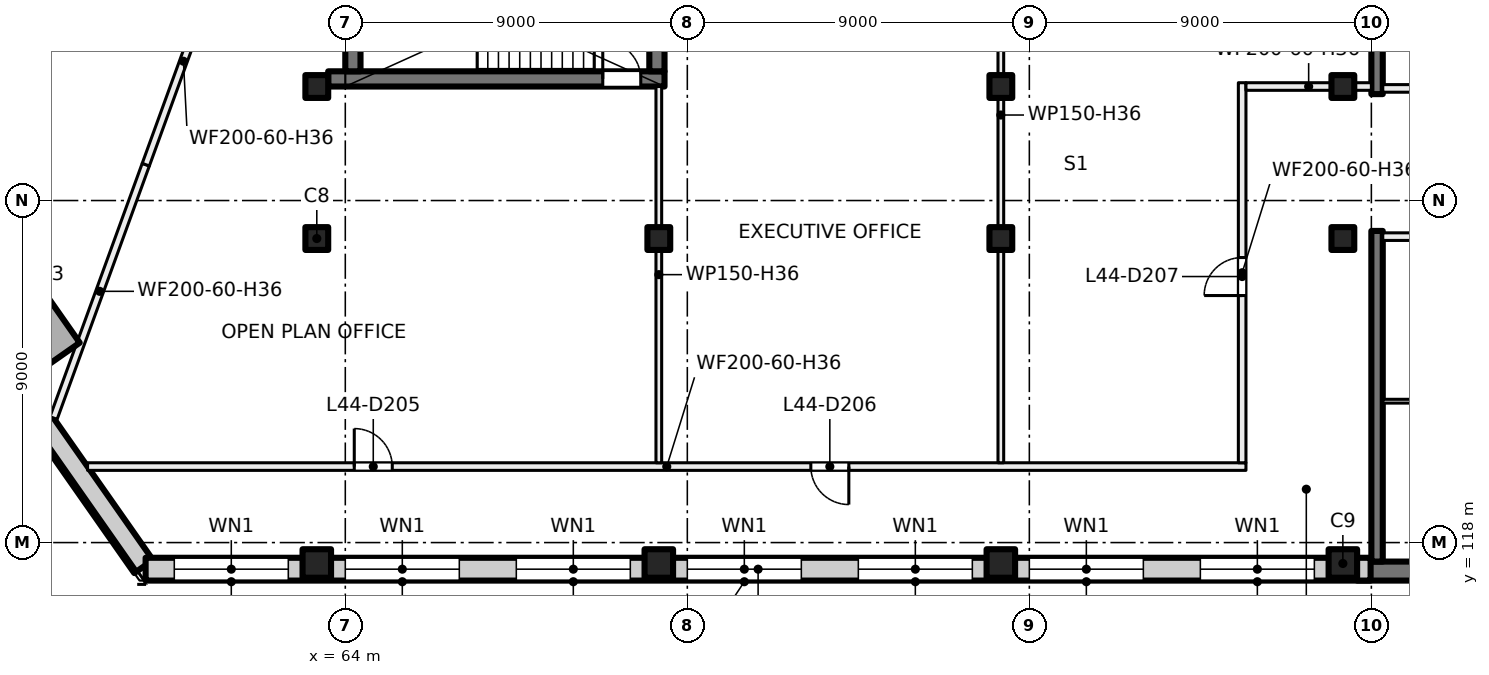
"""IFC4 building model, lengths in metres.
Left out: names, types, materials, properties, quantities, classifications, styles, units other than length and angle.
Written with IfcOpenShell. Run it as: python <this file> out.ifc"""

import sys

from ifc_helpers import new_model, si_unit, direction, frame, frame_2d, origin, origin_2d, place, context, subcontext, project, spatial, rectangle, hollow_rectangle, extrude, element, fill, save


model = new_model("IFC4")
c1 = context("Model", 3, precision=1e-05, world=origin(), true_north=direction((0.0, 1.0)))
c2 = subcontext(c1, "Body", "Model", "MODEL_VIEW")
j1 = project(units=[si_unit("LENGTHUNIT", "METRE"), si_unit("PLANEANGLEUNIT", "RADIAN")], contexts=[c1])
p1 = place(None, origin())
s1 = spatial("IfcSite", under=j1, at=p1, CompositionType="ELEMENT")
p2 = place(p1, origin())
s2 = spatial("IfcBuilding", under=s1, at=p2, CompositionType="ELEMENT")
p3 = place(p2, frame((0.0, 0.0, 188.0)))
s3 = spatial("IfcBuildingStorey", under=s2, at=p3, CompositionType="ELEMENT", Elevation=188.0)
p4 = place(p3, frame((56.036, 123.43, 0.0), z_axis=(0.0, 0.0, 1.0), x_axis=(0.573576436351, -0.819152044289, 0.0)))
e1 = element("IfcColumn", 1, at=p4, inside=s3, PredefinedType="COLUMN", context=c2, shape_type="SweptSolid", body=[
    extrude(hollow_rectangle(XDim=1.4, YDim=1.4, WallThickness=0.032, at=origin_2d()), origin(), (0.0, 0.0, 1.0), 4.0),
])
for number, where, z_axis, x_axis in (
    (2, (63.25, 130.0, 0.0), (0.0, 0.0, 1.0), (1.0, 0.0, 0.0)),
    (3, (81.25, 130.0, 0.0), (0.0, 0.0, 1.0), (1.0, 0.0, 0.0)),
    (4, (90.25, 130.0, 0.0), (0.0, 0.0, 1.0), (1.0, 0.0, 0.0)),
    (5, (63.25, 126.0, 0.0), (0.0, 0.0, 1.0), (1.0, 0.0, 0.0)),
    (6, (72.25, 126.0, 0.0), (0.0, 0.0, 1.0), (1.0, 0.0, 0.0)),
    (7, (81.25, 126.0, 0.0), (0.0, 0.0, 1.0), (1.0, 0.0, 0.0)),
    (8, (90.25, 126.0, 0.0), (0.0, 0.0, 1.0), (1.0, 0.0, 0.0)),
):
    element("IfcColumn", number, at=place(p3, frame(where, z_axis=z_axis, x_axis=x_axis)), inside=s3, PredefinedType="COLUMN", context=c2, shape_type="SweptSolid", body=[
        extrude(rectangle(XDim=0.6, YDim=0.6, at=origin_2d()), origin(), (0.0, 0.0, 1.0), 4.0),
    ])
for number, where, z_axis, x_axis in (
    (9, (63.25, 117.45, 0.0), (0.0, 0.0, 1.0), (1.0, 0.0, 0.0)),
    (10, (72.25, 117.45, 0.0), (0.0, 0.0, 1.0), (1.0, 0.0, 0.0)),
    (11, (81.25, 117.45, 0.0), (0.0, 0.0, 1.0), (1.0, 0.0, 0.0)),
    (12, (90.25, 117.45, 0.0), (0.0, 0.0, 1.0), (1.0, 0.0, 0.0)),
):
    element("IfcColumn", number, at=place(p3, frame(where, z_axis=z_axis, x_axis=x_axis)), inside=s3, PredefinedType="COLUMN", context=c2, shape_type="SweptSolid", body=[
        extrude(rectangle(XDim=0.75, YDim=0.75, at=origin_2d()), origin(), (0.0, 0.0, 1.0), 4.0),
    ])
p5 = place(p3, frame((99.6, 117.25, 0.0), z_axis=(0.0, 0.0, 1.0), x_axis=(-1.0, 0.0, 0.0)))
e13 = element("IfcWall", 13, at=p5, inside=s3, PredefinedType="SHEAR", context=c2, shape_type="SweptSolid", body=[
    extrude(rectangle(XDim=8.975, YDim=0.5, at=frame_2d((4.488, 0.0))), origin(), (0.0, 0.0, 1.0), 4.0),
])
for number, where, z_axis, x_axis in (
    (14, (91.15, 138.5, 0.0), (0.0, 0.0, 1.0), (0.0, -1.0, 0.0)),
    (15, (91.15, 126.2, 0.0), (0.0, 0.0, 1.0), (0.0, -1.0, 0.0)),
):
    element("IfcWall", number, at=place(p3, frame(where, z_axis=z_axis, x_axis=x_axis)), inside=s3, PredefinedType="SHEAR", context=c2, shape_type="SweptSolid", body=[
        extrude(rectangle(XDim=8.7, YDim=0.3, at=frame_2d((4.35, 0.0))), origin(), (0.0, 0.0, 1.0), 4.0),
    ])
p6 = place(p3, frame((63.55, 130.2, 0.0), z_axis=(0.0, 0.0, 1.0), x_axis=(1.0, 0.0, 0.0)))
e16 = element("IfcWall", 16, at=p6, inside=s3, PredefinedType="SHEAR", context=c2, shape_type="SweptSolid", body=[
    extrude(rectangle(XDim=8.85, YDim=0.4, at=frame_2d((4.425, 0.0))), origin(), (0.0, 0.0, 1.0), 4.0),
])
p7 = place(p6, frame((7.225, 0.0, 0.0)))
e17 = element("IfcOpeningElement", 17, at=p7, cuts=e16, PredefinedType="OPENING", context=c2, shape_type="SweptSolid", body=[
    extrude(rectangle(XDim=1.0, YDim=2.1, at=frame_2d((0.5, 1.05))), frame((0.0, 0.21, 0.0), z_axis=(0.0, -1.0, 0.0), x_axis=(1.0, 0.0, 0.0)), (0.0, 0.0, 1.0), 0.42),
])
for number, where, z_axis, x_axis in (
    (18, (64.2, 130.4, 0.0), (0.0, 0.0, 1.0), (0.0, 1.0, 0.0)),
    (19, (72.2, 130.4, 0.0), (0.0, 0.0, 1.0), (0.0, 1.0, 0.0)),
):
    element("IfcWall", number, at=place(p3, frame(where, z_axis=z_axis, x_axis=x_axis)), inside=s3, PredefinedType="SHEAR", context=c2, shape_type="SweptSolid", body=[
        extrude(rectangle(XDim=3.0, YDim=0.4, at=frame_2d((1.5, 0.0))), origin(), (0.0, 0.0, 1.0), 4.0),
    ])
p8 = place(p3, frame((58.694, 117.369, 0.0), z_axis=(0.0, 0.0, 1.0), x_axis=(-0.573579564522, 0.819149853911, 0.0)))
e20 = element("IfcWall", 20, at=p8, inside=s3, PredefinedType="SOLIDWALL", context=c2, shape_type="SweptSolid", body=[
    extrude(rectangle(XDim=26.138, YDim=0.6, at=frame_2d((13.069, 0.0))), origin(), (0.0, 0.0, 1.0), 3.625),
])
p9 = place(p3, frame((90.98, 117.3, 0.0), z_axis=(0.0, 0.0, 1.0), x_axis=(-1.0, 0.0, 0.0)))
e21 = element("IfcWall", 21, at=p9, inside=s3, PredefinedType="SOLIDWALL", context=c2, shape_type="SweptSolid", body=[
    extrude(rectangle(XDim=32.235, YDim=0.6, at=frame_2d((16.117, 0.0))), origin(), (0.0, 0.0, 1.0), 3.625),
])
p10 = place(p9, frame((1.48, 0.0, 0.9)))
e22 = element("IfcOpeningElement", 22, at=p10, cuts=e21, PredefinedType="OPENING", context=c2, shape_type="SweptSolid", body=[
    extrude(rectangle(XDim=3.0, YDim=2.4, at=frame_2d((1.5, 1.2))), frame((0.0, 0.31, 0.0), z_axis=(0.0, -1.0, 0.0), x_axis=(1.0, 0.0, 0.0)), (0.0, 0.0, 1.0), 0.62),
])
p11 = place(p9, frame((5.98, 0.0, 0.9)))
e23 = element("IfcOpeningElement", 23, at=p11, cuts=e21, PredefinedType="OPENING", context=c2, shape_type="SweptSolid", body=[
    extrude(rectangle(XDim=3.0, YDim=2.4, at=frame_2d((1.5, 1.2))), frame((0.0, 0.31, 0.0), z_axis=(0.0, -1.0, 0.0), x_axis=(1.0, 0.0, 0.0)), (0.0, 0.0, 1.0), 0.62),
])
p12 = place(p9, frame((10.48, 0.0, 0.9)))
e24 = element("IfcOpeningElement", 24, at=p12, cuts=e21, PredefinedType="OPENING", context=c2, shape_type="SweptSolid", body=[
    extrude(rectangle(XDim=3.0, YDim=2.4, at=frame_2d((1.5, 1.2))), frame((0.0, 0.31, 0.0), z_axis=(0.0, -1.0, 0.0), x_axis=(1.0, 0.0, 0.0)), (0.0, 0.0, 1.0), 0.62),
])
p13 = place(p9, frame((14.98, 0.0, 0.9)))
e25 = element("IfcOpeningElement", 25, at=p13, cuts=e21, PredefinedType="OPENING", context=c2, shape_type="SweptSolid", body=[
    extrude(rectangle(XDim=3.0, YDim=2.4, at=frame_2d((1.5, 1.2))), frame((0.0, 0.31, 0.0), z_axis=(0.0, -1.0, 0.0), x_axis=(1.0, 0.0, 0.0)), (0.0, 0.0, 1.0), 0.62),
])
p14 = place(p9, frame((19.48, 0.0, 0.9)))
e26 = element("IfcOpeningElement", 26, at=p14, cuts=e21, PredefinedType="OPENING", context=c2, shape_type="SweptSolid", body=[
    extrude(rectangle(XDim=3.0, YDim=2.4, at=frame_2d((1.5, 1.2))), frame((0.0, 0.31, 0.0), z_axis=(0.0, -1.0, 0.0), x_axis=(1.0, 0.0, 0.0)), (0.0, 0.0, 1.0), 0.62),
])
p15 = place(p9, frame((23.98, 0.0, 0.9)))
e27 = element("IfcOpeningElement", 27, at=p15, cuts=e21, PredefinedType="OPENING", context=c2, shape_type="SweptSolid", body=[
    extrude(rectangle(XDim=3.0, YDim=2.4, at=frame_2d((1.5, 1.2))), frame((0.0, 0.31, 0.0), z_axis=(0.0, -1.0, 0.0), x_axis=(1.0, 0.0, 0.0)), (0.0, 0.0, 1.0), 0.62),
])
p16 = place(p9, frame((28.48, 0.0, 0.9)))
e28 = element("IfcOpeningElement", 28, at=p16, cuts=e21, PredefinedType="OPENING", context=c2, shape_type="SweptSolid", body=[
    extrude(rectangle(XDim=3.0, YDim=2.4, at=frame_2d((1.5, 1.2))), frame((0.0, 0.31, 0.0), z_axis=(0.0, -1.0, 0.0), x_axis=(1.0, 0.0, 0.0)), (0.0, 0.0, 1.0), 0.62),
])
p17 = place(p3, frame((95.25, 126.05, 0.0), z_axis=(0.0, 0.0, 1.0), x_axis=(-1.0, 0.0, 0.0)))
e29 = element("IfcWall", 29, at=p17, inside=s3, PredefinedType="PARTITIONING", context=c2, shape_type="SweptSolid", body=[
    extrude(rectangle(XDim=3.95, YDim=0.2, at=frame_2d((1.975, 0.0))), origin(), (0.0, 0.0, 1.0), 3.625),
])
p18 = place(p17, frame((0.3, 0.0, 0.0)))
e30 = element("IfcOpeningElement", 30, at=p18, cuts=e29, PredefinedType="OPENING", context=c2, shape_type="SweptSolid", body=[
    extrude(rectangle(XDim=1.2, YDim=2.1, at=frame_2d((0.6, 1.05))), frame((0.0, 0.11, 0.0), z_axis=(0.0, -1.0, 0.0), x_axis=(1.0, 0.0, 0.0)), (0.0, 0.0, 1.0), 0.22),
])
p19 = place(p3, frame((93.4, 121.72, 0.0), z_axis=(0.0, 0.0, 1.0), x_axis=(-1.0, 0.0, 0.0)))
e31 = element("IfcWall", 31, at=p19, inside=s3, PredefinedType="PARTITIONING", context=c2, shape_type="SweptSolid", body=[
    extrude(rectangle(XDim=2.1, YDim=0.1, at=frame_2d((1.05, 0.0))), origin(), (0.0, 0.0, 1.0), 3.625),
])
p20 = place(p3, frame((91.3, 129.95, 0.0), z_axis=(0.0, 0.0, 1.0), x_axis=(1.0, 0.0, 0.0)))
e32 = element("IfcWall", 32, at=p20, inside=s3, PredefinedType="PARTITIONING", context=c2, shape_type="SweptSolid", body=[
    extrude(rectangle(XDim=3.95, YDim=0.2, at=frame_2d((1.975, 0.0))), origin(), (0.0, 0.0, 1.0), 3.625),
])
p21 = place(p20, frame((2.45, 0.0, 0.0)))
e33 = element("IfcOpeningElement", 33, at=p21, cuts=e32, PredefinedType="OPENING", context=c2, shape_type="SweptSolid", body=[
    extrude(rectangle(XDim=1.2, YDim=2.1, at=frame_2d((0.6, 1.05))), frame((0.0, 0.11, 0.0), z_axis=(0.0, -1.0, 0.0), x_axis=(1.0, 0.0, 0.0)), (0.0, 0.0, 1.0), 0.22),
])
p22 = place(p3, frame((53.523, 125.277, 0.0), z_axis=(0.0, 0.0, 1.0), x_axis=(0.341962677516, 0.93971353464, 0.0)))
e34 = element("IfcWall", 34, at=p22, inside=s3, PredefinedType="PARTITIONING", context=c2, shape_type="SweptSolid", body=[
    extrude(rectangle(XDim=10.086, YDim=0.2, at=frame_2d((5.043, 0.0))), origin(), (0.0, 0.0, 1.0), 3.625),
])
p23 = place(p3, frame((56.323, 121.278, 0.0), z_axis=(0.0, 0.0, 1.0), x_axis=(0.342116070913, 0.939657700454, 0.0)))
e35 = element("IfcWall", 35, at=p23, inside=s3, PredefinedType="PARTITIONING", context=c2, shape_type="SweptSolid", body=[
    extrude(rectangle(XDim=7.094, YDim=0.2, at=frame_2d((3.547, 0.0))), origin(), (0.0, 0.0, 1.0), 3.625),
])
p24 = place(p3, frame((57.218, 120.0, 0.0), z_axis=(0.0, 0.0, 1.0), x_axis=(1.0, 0.0, 0.0)))
e36 = element("IfcWall", 36, at=p24, inside=s3, PredefinedType="PARTITIONING", context=c2, shape_type="SweptSolid", body=[
    extrude(rectangle(XDim=30.482, YDim=0.2, at=frame_2d((15.241, 0.0))), origin(), (0.0, 0.0, 1.0), 3.625),
])
p25 = place(p24, frame((7.018, 0.0, 0.0)))
e37 = element("IfcOpeningElement", 37, at=p25, cuts=e36, PredefinedType="OPENING", context=c2, shape_type="SweptSolid", body=[
    extrude(rectangle(XDim=1.0, YDim=2.1, at=frame_2d((0.5, 1.05))), frame((0.0, 0.11, 0.0), z_axis=(0.0, -1.0, 0.0), x_axis=(1.0, 0.0, 0.0)), (0.0, 0.0, 1.0), 0.22),
])
p26 = place(p24, frame((19.032, 0.0, 0.0)))
e38 = element("IfcOpeningElement", 38, at=p26, cuts=e36, PredefinedType="OPENING", context=c2, shape_type="SweptSolid", body=[
    extrude(rectangle(XDim=1.0, YDim=2.1, at=frame_2d((0.5, 1.05))), frame((0.0, 0.11, 0.0), z_axis=(0.0, -1.0, 0.0), x_axis=(1.0, 0.0, 0.0)), (0.0, 0.0, 1.0), 0.22),
])
p27 = place(p3, frame((58.75, 127.944, 0.0), z_axis=(0.0, 0.0, 1.0), x_axis=(0.342007027005, 0.939697394633, 0.0)))
e39 = element("IfcWall", 39, at=p27, inside=s3, PredefinedType="PARTITIONING", context=c2, shape_type="SweptSolid", body=[
    extrude(rectangle(XDim=5.792, YDim=0.2, at=frame_2d((2.896, 0.0))), origin(), (0.0, 0.0, 1.0), 3.625),
])
p28 = place(p3, frame((72.25, 120.1, 0.0), z_axis=(0.0, 0.0, 1.0), x_axis=(0.0, 1.0, 0.0)))
e40 = element("IfcWall", 40, at=p28, inside=s3, PredefinedType="PARTITIONING", context=c2, shape_type="SweptSolid", body=[
    extrude(rectangle(XDim=9.9, YDim=0.15, at=frame_2d((4.95, 0.0))), origin(), (0.0, 0.0, 1.0), 3.625),
])
p29 = place(p3, frame((81.25, 120.1, 0.0), z_axis=(0.0, 0.0, 1.0), x_axis=(0.0, 1.0, 0.0)))
e41 = element("IfcWall", 41, at=p29, inside=s3, PredefinedType="PARTITIONING", context=c2, shape_type="SweptSolid", body=[
    extrude(rectangle(XDim=18.3, YDim=0.15, at=frame_2d((9.15, 0.0))), origin(), (0.0, 0.0, 1.0), 3.625),
])
p30 = place(p3, frame((87.6, 120.1, 0.0), z_axis=(0.0, 0.0, 1.0), x_axis=(0.0, 1.0, 0.0)))
e42 = element("IfcWall", 42, at=p30, inside=s3, PredefinedType="PARTITIONING", context=c2, shape_type="SweptSolid", body=[
    extrude(rectangle(XDim=10.0, YDim=0.2, at=frame_2d((5.0, 0.0))), origin(), (0.0, 0.0, 1.0), 3.625),
])
p31 = place(p30, frame((4.4, 0.0, 0.0)))
e43 = element("IfcOpeningElement", 43, at=p31, cuts=e42, PredefinedType="OPENING", context=c2, shape_type="SweptSolid", body=[
    extrude(rectangle(XDim=1.0, YDim=2.1, at=frame_2d((0.5, 1.05))), frame((0.0, 0.11, 0.0), z_axis=(0.0, -1.0, 0.0), x_axis=(1.0, 0.0, 0.0)), (0.0, 0.0, 1.0), 0.22),
])
p32 = place(p3, frame((87.7, 130.0, 0.0), z_axis=(0.0, 0.0, 1.0), x_axis=(1.0, 0.0, 0.0)))
e44 = element("IfcWall", 44, at=p32, inside=s3, PredefinedType="PARTITIONING", context=c2, shape_type="SweptSolid", body=[
    extrude(rectangle(XDim=3.3, YDim=0.2, at=frame_2d((1.65, 0.0))), origin(), (0.0, 0.0, 1.0), 3.625),
])
p33 = place(p10, origin())
e45 = element("IfcWindow", 45, at=p33, inside=s3, PartitioningType="SINGLE_PANEL", PredefinedType="WINDOW", context=c2, shape_type="SweptSolid", body=[
    extrude(rectangle(XDim=3.0, YDim=2.4, at=frame_2d((1.5, 1.2))), frame((0.0, 0.03, 0.0), z_axis=(0.0, -1.0, 0.0), x_axis=(1.0, 0.0, 0.0)), (0.0, 0.0, 1.0), 0.06),
])
fill(e22, e45)
p34 = place(p11, origin())
e46 = element("IfcWindow", 46, at=p34, inside=s3, PartitioningType="SINGLE_PANEL", PredefinedType="WINDOW", context=c2, shape_type="SweptSolid", body=[
    extrude(rectangle(XDim=3.0, YDim=2.4, at=frame_2d((1.5, 1.2))), frame((0.0, 0.03, 0.0), z_axis=(0.0, -1.0, 0.0), x_axis=(1.0, 0.0, 0.0)), (0.0, 0.0, 1.0), 0.06),
])
fill(e23, e46)
p35 = place(p12, origin())
e47 = element("IfcWindow", 47, at=p35, inside=s3, PartitioningType="SINGLE_PANEL", PredefinedType="WINDOW", context=c2, shape_type="SweptSolid", body=[
    extrude(rectangle(XDim=3.0, YDim=2.4, at=frame_2d((1.5, 1.2))), frame((0.0, 0.03, 0.0), z_axis=(0.0, -1.0, 0.0), x_axis=(1.0, 0.0, 0.0)), (0.0, 0.0, 1.0), 0.06),
])
fill(e24, e47)
p36 = place(p13, origin())
e48 = element("IfcWindow", 48, at=p36, inside=s3, PartitioningType="SINGLE_PANEL", PredefinedType="WINDOW", context=c2, shape_type="SweptSolid", body=[
    extrude(rectangle(XDim=3.0, YDim=2.4, at=frame_2d((1.5, 1.2))), frame((0.0, 0.03, 0.0), z_axis=(0.0, -1.0, 0.0), x_axis=(1.0, 0.0, 0.0)), (0.0, 0.0, 1.0), 0.06),
])
fill(e25, e48)
p37 = place(p14, origin())
e49 = element("IfcWindow", 49, at=p37, inside=s3, PartitioningType="SINGLE_PANEL", PredefinedType="WINDOW", context=c2, shape_type="SweptSolid", body=[
    extrude(rectangle(XDim=3.0, YDim=2.4, at=frame_2d((1.5, 1.2))), frame((0.0, 0.03, 0.0), z_axis=(0.0, -1.0, 0.0), x_axis=(1.0, 0.0, 0.0)), (0.0, 0.0, 1.0), 0.06),
])
fill(e26, e49)
p38 = place(p15, origin())
e50 = element("IfcWindow", 50, at=p38, inside=s3, PartitioningType="SINGLE_PANEL", PredefinedType="WINDOW", context=c2, shape_type="SweptSolid", body=[
    extrude(rectangle(XDim=3.0, YDim=2.4, at=frame_2d((1.5, 1.2))), frame((0.0, 0.03, 0.0), z_axis=(0.0, -1.0, 0.0), x_axis=(1.0, 0.0, 0.0)), (0.0, 0.0, 1.0), 0.06),
])
fill(e27, e50)
p39 = place(p16, origin())
e51 = element("IfcWindow", 51, at=p39, inside=s3, PartitioningType="SINGLE_PANEL", PredefinedType="WINDOW", context=c2, shape_type="SweptSolid", body=[
    extrude(rectangle(XDim=3.0, YDim=2.4, at=frame_2d((1.5, 1.2))), frame((0.0, 0.03, 0.0), z_axis=(0.0, -1.0, 0.0), x_axis=(1.0, 0.0, 0.0)), (0.0, 0.0, 1.0), 0.06),
])
fill(e28, e51)
p40 = place(p7, origin())
e52 = element("IfcDoor", 52, at=p40, inside=s3, OperationType="SINGLE_SWING_LEFT", PredefinedType="DOOR", context=c2, shape_type="SweptSolid", body=[
    extrude(rectangle(XDim=1.0, YDim=2.1, at=frame_2d((0.5, 1.05))), frame((0.0, 0.025, 0.0), z_axis=(0.0, -1.0, 0.0), x_axis=(1.0, 0.0, 0.0)), (0.0, 0.0, 1.0), 0.05),
])
fill(e17, e52)
p41 = place(p25, origin())
e53 = element("IfcDoor", 53, at=p41, inside=s3, OperationType="SINGLE_SWING_LEFT", PredefinedType="DOOR", context=c2, shape_type="SweptSolid", body=[
    extrude(rectangle(XDim=1.0, YDim=2.1, at=frame_2d((0.5, 1.05))), frame((0.0, 0.025, 0.0), z_axis=(0.0, -1.0, 0.0), x_axis=(1.0, 0.0, 0.0)), (0.0, 0.0, 1.0), 0.05),
])
fill(e37, e53)
p42 = place(p26, origin())
e54 = element("IfcDoor", 54, at=p42, inside=s3, OperationType="SINGLE_SWING_RIGHT", PredefinedType="DOOR", context=c2, shape_type="SweptSolid", body=[
    extrude(rectangle(XDim=1.0, YDim=2.1, at=frame_2d((0.5, 1.05))), frame((0.0, 0.025, 0.0), z_axis=(0.0, -1.0, 0.0), x_axis=(1.0, 0.0, 0.0)), (0.0, 0.0, 1.0), 0.05),
])
fill(e38, e54)
p43 = place(p31, origin())
e55 = element("IfcDoor", 55, at=p43, inside=s3, OperationType="SINGLE_SWING_LEFT", PredefinedType="DOOR", context=c2, shape_type="SweptSolid", body=[
    extrude(rectangle(XDim=1.0, YDim=2.1, at=frame_2d((0.5, 1.05))), frame((0.0, 0.025, 0.0), z_axis=(0.0, -1.0, 0.0), x_axis=(1.0, 0.0, 0.0)), (0.0, 0.0, 1.0), 0.05),
])
fill(e43, e55)
save(model, sys.argv[1])
